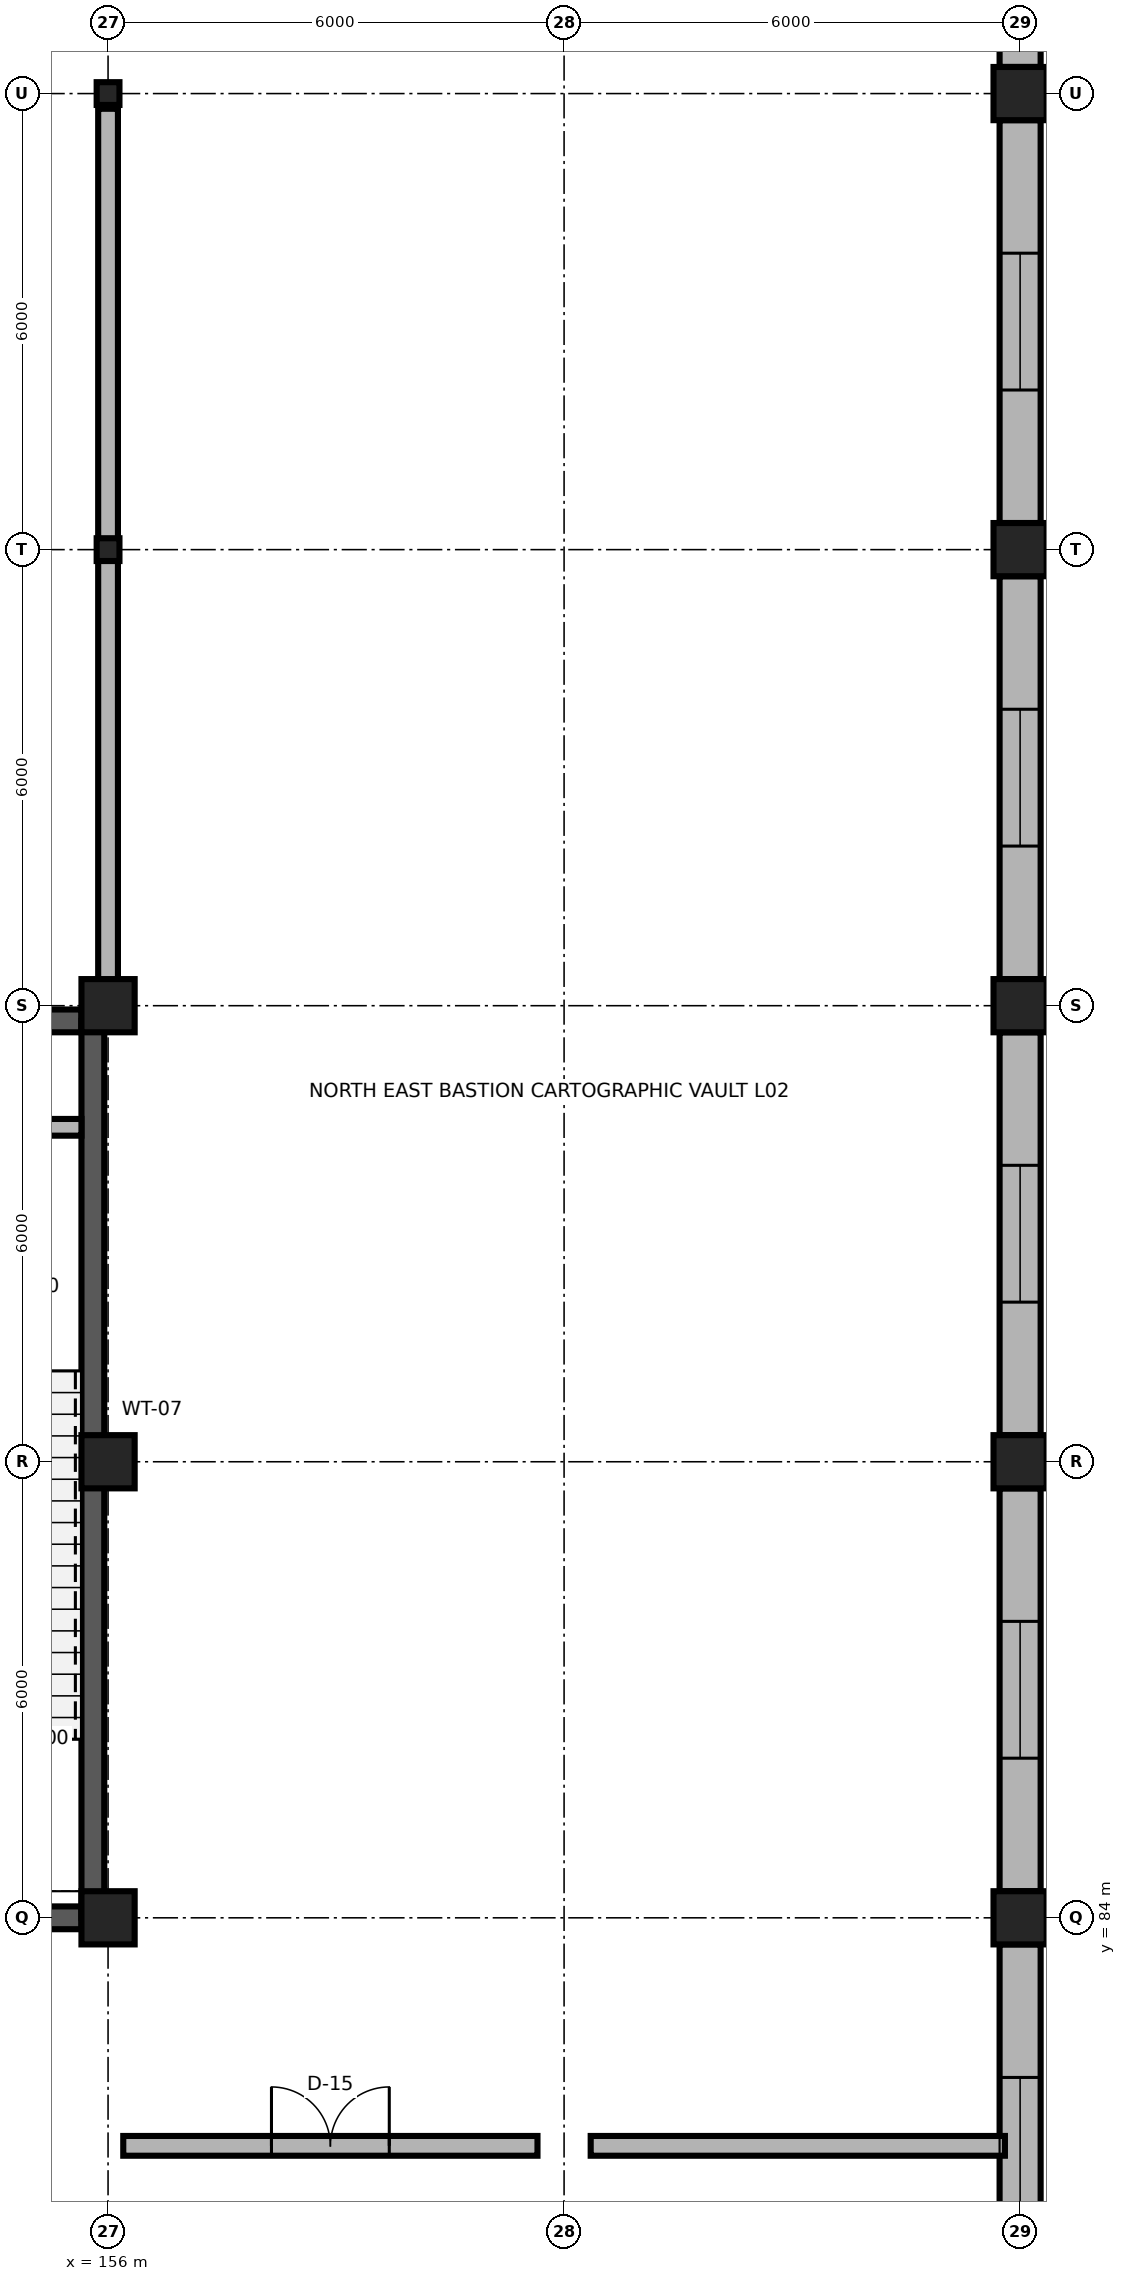
"""IFC4 building model, lengths in metres.
Left out: names, types, materials, properties, quantities, classifications, styles, units other than length and angle.
Written with IfcOpenShell. Run it as: python <this file> out.ifc"""

import sys

from ifc_helpers import new_model, si_unit, direction, frame, frame_2d, origin, origin_2d, place, context, subcontext, project, spatial, rectangle, i_section, extrude, element, fill, save


model = new_model("IFC4")
c1 = context("Model", 3, precision=1e-05, world=origin(), true_north=direction((0.0, 1.0)))
c2 = subcontext(c1, "Body", "Model", "MODEL_VIEW")
j1 = project(units=[si_unit("LENGTHUNIT", "METRE"), si_unit("PLANEANGLEUNIT", "RADIAN")], contexts=[c1])
p1 = place(None, origin())
s1 = spatial("IfcSite", under=j1, at=p1, CompositionType="ELEMENT")
p2 = place(p1, origin())
s2 = spatial("IfcBuilding", under=s1, at=p2, CompositionType="ELEMENT")
p3 = place(p2, frame((0.0, 0.0, 6.0)))
s3 = spatial("IfcBuildingStorey", under=s2, at=p3, CompositionType="ELEMENT", Elevation=6.0)
for number, where, z_axis, x_axis in (
    (1, (156.0, 84.0, 0.0), (0.0, 0.0, 1.0), (1.0, 0.0, 0.0)),
    (2, (168.0, 84.0, 0.0), (0.0, 0.0, 1.0), (1.0, 0.0, 0.0)),
    (3, (156.0, 90.0, 0.0), (0.0, 0.0, 1.0), (1.0, 0.0, 0.0)),
    (4, (168.0, 90.0, 0.0), (0.0, 0.0, 1.0), (1.0, 0.0, 0.0)),
    (5, (156.0, 96.0, 0.0), (0.0, 0.0, 1.0), (1.0, 0.0, 0.0)),
    (6, (168.0, 96.0, 0.0), (0.0, 0.0, 1.0), (1.0, 0.0, 0.0)),
):
    element("IfcColumn", number, at=place(p3, frame(where, z_axis=z_axis, x_axis=x_axis)), inside=s3, PredefinedType="COLUMN", context=c2, shape_type="SweptSolid", body=[
        extrude(rectangle(XDim=0.7, YDim=0.7, at=origin_2d()), origin(), (0.0, 0.0, 1.0), 6.0),
    ])
p4 = place(p3, frame((156.0, 102.0, 0.0), z_axis=(0.0, 0.0, 1.0), x_axis=(1.0, 0.0, 0.0)))
e7 = element("IfcColumn", 7, at=p4, inside=s3, PredefinedType="COLUMN", context=c2, shape_type="SweptSolid", body=[
    extrude(i_section(OverallWidth=0.3, OverallDepth=0.3, WebThickness=0.01, FlangeThickness=0.015, FilletRadius=0.018, at=origin_2d()), origin(), (0.0, 0.0, 1.0), 6.0),
])
p5 = place(p3, frame((168.0, 102.0, 0.0), z_axis=(0.0, 0.0, 1.0), x_axis=(1.0, 0.0, 0.0)))
e8 = element("IfcColumn", 8, at=p5, inside=s3, PredefinedType="COLUMN", context=c2, shape_type="SweptSolid", body=[
    extrude(rectangle(XDim=0.7, YDim=0.7, at=origin_2d()), origin(), (0.0, 0.0, 1.0), 6.0),
])
p6 = place(p3, frame((156.0, 108.0, 0.0), z_axis=(0.0, 0.0, 1.0), x_axis=(1.0, 0.0, 0.0)))
e9 = element("IfcColumn", 9, at=p6, inside=s3, PredefinedType="COLUMN", context=c2, shape_type="SweptSolid", body=[
    extrude(i_section(OverallWidth=0.3, OverallDepth=0.3, WebThickness=0.01, FlangeThickness=0.015, FilletRadius=0.018, at=origin_2d()), origin(), (0.0, 0.0, 1.0), 6.0),
])
p7 = place(p3, frame((168.0, 108.0, 0.0), z_axis=(0.0, 0.0, 1.0), x_axis=(1.0, 0.0, 0.0)))
e10 = element("IfcColumn", 10, at=p7, inside=s3, PredefinedType="COLUMN", context=c2, shape_type="SweptSolid", body=[
    extrude(rectangle(XDim=0.7, YDim=0.7, at=origin_2d()), origin(), (0.0, 0.0, 1.0), 6.0),
])
p8 = place(p3, frame((168.0, 78.35, 0.0), z_axis=(0.0, 0.0, 1.0), x_axis=(0.0, 1.0, 0.0)))
e11 = element("IfcWall", 11, at=p8, inside=s3, PredefinedType="SOLIDWALL", context=c2, shape_type="SweptSolid", body=[
    extrude(rectangle(XDim=5.3, YDim=0.54, at=frame_2d((2.65, 0.0))), origin(), (0.0, 0.0, 1.0), 5.31),
])
p9 = place(p8, frame((1.75, 0.0, 0.85)))
e12 = element("IfcOpeningElement", 12, at=p9, cuts=e11, PredefinedType="OPENING", context=c2, shape_type="SweptSolid", body=[
    extrude(rectangle(XDim=1.8, YDim=3.3, at=frame_2d((0.9, 1.65))), frame((0.0, 0.285, 0.0), z_axis=(0.0, -1.0, 0.0), x_axis=(1.0, 0.0, 0.0)), (0.0, 0.0, 1.0), 0.57),
])
p10 = place(p3, frame((168.0, 84.35, 0.0), z_axis=(0.0, 0.0, 1.0), x_axis=(0.0, 1.0, 0.0)))
e13 = element("IfcWall", 13, at=p10, inside=s3, PredefinedType="SOLIDWALL", context=c2, shape_type="SweptSolid", body=[
    extrude(rectangle(XDim=5.3, YDim=0.54, at=frame_2d((2.65, 0.0))), origin(), (0.0, 0.0, 1.0), 5.31),
])
p11 = place(p10, frame((1.75, 0.0, 0.85)))
e14 = element("IfcOpeningElement", 14, at=p11, cuts=e13, PredefinedType="OPENING", context=c2, shape_type="SweptSolid", body=[
    extrude(rectangle(XDim=1.8, YDim=3.3, at=frame_2d((0.9, 1.65))), frame((0.0, 0.285, 0.0), z_axis=(0.0, -1.0, 0.0), x_axis=(1.0, 0.0, 0.0)), (0.0, 0.0, 1.0), 0.57),
])
p12 = place(p3, frame((168.0, 90.35, 0.0), z_axis=(0.0, 0.0, 1.0), x_axis=(0.0, 1.0, 0.0)))
e15 = element("IfcWall", 15, at=p12, inside=s3, PredefinedType="SOLIDWALL", context=c2, shape_type="SweptSolid", body=[
    extrude(rectangle(XDim=5.3, YDim=0.54, at=frame_2d((2.65, 0.0))), origin(), (0.0, 0.0, 1.0), 5.31),
])
p13 = place(p12, frame((1.75, 0.0, 0.85)))
e16 = element("IfcOpeningElement", 16, at=p13, cuts=e15, PredefinedType="OPENING", context=c2, shape_type="SweptSolid", body=[
    extrude(rectangle(XDim=1.8, YDim=3.3, at=frame_2d((0.9, 1.65))), frame((0.0, 0.285, 0.0), z_axis=(0.0, -1.0, 0.0), x_axis=(1.0, 0.0, 0.0)), (0.0, 0.0, 1.0), 0.57),
])
p14 = place(p3, frame((168.0, 96.35, 0.0), z_axis=(0.0, 0.0, 1.0), x_axis=(0.0, 1.0, 0.0)))
e17 = element("IfcWall", 17, at=p14, inside=s3, PredefinedType="SOLIDWALL", context=c2, shape_type="SweptSolid", body=[
    extrude(rectangle(XDim=5.3, YDim=0.54, at=frame_2d((2.65, 0.0))), origin(), (0.0, 0.0, 1.0), 5.31),
])
p15 = place(p14, frame((1.75, 0.0, 0.85)))
e18 = element("IfcOpeningElement", 18, at=p15, cuts=e17, PredefinedType="OPENING", context=c2, shape_type="SweptSolid", body=[
    extrude(rectangle(XDim=1.8, YDim=3.3, at=frame_2d((0.9, 1.65))), frame((0.0, 0.285, 0.0), z_axis=(0.0, -1.0, 0.0), x_axis=(1.0, 0.0, 0.0)), (0.0, 0.0, 1.0), 0.57),
])
p16 = place(p3, frame((168.0, 102.35, 0.0), z_axis=(0.0, 0.0, 1.0), x_axis=(0.0, 1.0, 0.0)))
e19 = element("IfcWall", 19, at=p16, inside=s3, PredefinedType="SOLIDWALL", context=c2, shape_type="SweptSolid", body=[
    extrude(rectangle(XDim=5.3, YDim=0.54, at=frame_2d((2.65, 0.0))), origin(), (0.0, 0.0, 1.0), 5.31),
])
p17 = place(p16, frame((1.75, 0.0, 0.85)))
e20 = element("IfcOpeningElement", 20, at=p17, cuts=e19, PredefinedType="OPENING", context=c2, shape_type="SweptSolid", body=[
    extrude(rectangle(XDim=1.8, YDim=3.3, at=frame_2d((0.9, 1.65))), frame((0.0, 0.285, 0.0), z_axis=(0.0, -1.0, 0.0), x_axis=(1.0, 0.0, 0.0)), (0.0, 0.0, 1.0), 0.57),
])
p18 = place(p3, frame((168.0, 108.35, 0.0), z_axis=(0.0, 0.0, 1.0), x_axis=(0.0, 1.0, 0.0)))
e21 = element("IfcWall", 21, at=p18, inside=s3, PredefinedType="SOLIDWALL", context=c2, shape_type="SweptSolid", body=[
    extrude(rectangle(XDim=5.3, YDim=0.54, at=frame_2d((2.65, 0.0))), origin(), (0.0, 0.0, 1.0), 5.31),
])
p19 = place(p18, frame((1.9, 0.0, 0.85)))
e22 = element("IfcOpeningElement", 22, at=p19, cuts=e21, PredefinedType="OPENING", context=c2, shape_type="SweptSolid", body=[
    extrude(rectangle(XDim=1.5, YDim=2.8, at=frame_2d((0.75, 1.4))), frame((0.0, 0.285, 0.0), z_axis=(0.0, -1.0, 0.0), x_axis=(1.0, 0.0, 0.0)), (0.0, 0.0, 1.0), 0.57),
])
p20 = place(p3, frame((150.35, 84.0, 0.0), z_axis=(0.0, 0.0, 1.0), x_axis=(1.0, 0.0, 0.0)))
e23 = element("IfcWall", 23, at=p20, inside=s3, PredefinedType="SHEAR", context=c2, shape_type="SweptSolid", body=[
    extrude(rectangle(XDim=5.3, YDim=0.3, at=frame_2d((2.65, 0.0))), origin(), (0.0, 0.0, 1.0), 5.76),
])
p21 = place(p20, frame((1.925, 0.0, 0.0)))
e24 = element("IfcOpeningElement", 24, at=p21, cuts=e23, PredefinedType="OPENING", context=c2, shape_type="SweptSolid", body=[
    extrude(rectangle(XDim=1.45, YDim=2.25, at=frame_2d((0.725, 1.125))), frame((0.0, 0.165, 0.0), z_axis=(0.0, -1.0, 0.0), x_axis=(1.0, 0.0, 0.0)), (0.0, 0.0, 1.0), 0.33),
])
p22 = place(p3, frame((150.35, 95.8, 0.0), z_axis=(0.0, 0.0, 1.0), x_axis=(1.0, 0.0, 0.0)))
e25 = element("IfcWall", 25, at=p22, inside=s3, PredefinedType="SHEAR", context=c2, shape_type="SweptSolid", body=[
    extrude(rectangle(XDim=5.3, YDim=0.3, at=frame_2d((2.65, 0.0))), origin(), (0.0, 0.0, 1.0), 5.76),
])
p23 = place(p3, frame((155.8, 84.0, 0.0), z_axis=(0.0, 0.0, 1.0), x_axis=(0.0, 1.0, 0.0)))
e26 = element("IfcWall", 26, at=p23, inside=s3, PredefinedType="SHEAR", context=c2, shape_type="SweptSolid", body=[
    extrude(rectangle(XDim=11.8, YDim=0.3, at=frame_2d((5.9, 0.0))), origin(), (0.0, 0.0, 1.0), 5.76),
])
p24 = place(p3, frame((154.55, 94.4, 0.0), z_axis=(0.0, 0.0, 1.0), x_axis=(1.0, 0.0, 0.0)))
e27 = element("IfcWall", 27, at=p24, inside=s3, PredefinedType="PARTITIONING", context=c2, shape_type="SweptSolid", body=[
    extrude(rectangle(XDim=1.1, YDim=0.22, at=frame_2d((0.55, 0.0))), origin(), (0.0, 0.0, 1.0), 5.76),
])
p25 = place(p3, frame((156.2, 81.0, 0.0), z_axis=(0.0, 0.0, 1.0), x_axis=(1.0, 0.0, 0.0)))
e28 = element("IfcWall", 28, at=p25, inside=s3, PredefinedType="PARTITIONING", context=c2, shape_type="SweptSolid", body=[
    extrude(rectangle(XDim=5.45, YDim=0.26, at=frame_2d((2.725, 0.0))), origin(), (0.0, 0.0, 1.0), 5.76),
])
p26 = place(p25, frame((1.95, 0.0, 0.0)))
e29 = element("IfcOpeningElement", 29, at=p26, cuts=e28, PredefinedType="OPENING", context=c2, shape_type="SweptSolid", body=[
    extrude(rectangle(XDim=1.55, YDim=2.3, at=frame_2d((0.775, 1.15))), frame((0.0, 0.145, 0.0), z_axis=(0.0, -1.0, 0.0), x_axis=(1.0, 0.0, 0.0)), (0.0, 0.0, 1.0), 0.29),
])
p27 = place(p3, frame((162.35, 81.0, 0.0), z_axis=(0.0, 0.0, 1.0), x_axis=(1.0, 0.0, 0.0)))
e30 = element("IfcWall", 30, at=p27, inside=s3, PredefinedType="PARTITIONING", context=c2, shape_type="SweptSolid", body=[
    extrude(rectangle(XDim=5.45, YDim=0.26, at=frame_2d((2.725, 0.0))), origin(), (0.0, 0.0, 1.0), 5.76),
])
p28 = place(p3, frame((156.0, 96.2, 0.0), z_axis=(0.0, 0.0, 1.0), x_axis=(0.0, 1.0, 0.0)))
e31 = element("IfcWall", 31, at=p28, inside=s3, PredefinedType="PARTITIONING", context=c2, shape_type="SweptSolid", body=[
    extrude(rectangle(XDim=11.6, YDim=0.26, at=frame_2d((5.8, 0.0))), origin(), (0.0, 0.0, 1.0), 5.32),
])
p29 = place(p9, origin())
e32 = element("IfcWindow", 32, at=p29, inside=s3, PartitioningType="SINGLE_PANEL", PredefinedType="WINDOW", context=c2, shape_type="SweptSolid", body=[
    extrude(rectangle(XDim=1.8, YDim=3.3, at=frame_2d((0.9, 1.65))), frame((0.0, 0.03, 0.0), z_axis=(0.0, -1.0, 0.0), x_axis=(1.0, 0.0, 0.0)), (0.0, 0.0, 1.0), 0.06),
])
fill(e12, e32)
p30 = place(p11, origin())
e33 = element("IfcWindow", 33, at=p30, inside=s3, PartitioningType="SINGLE_PANEL", PredefinedType="WINDOW", context=c2, shape_type="SweptSolid", body=[
    extrude(rectangle(XDim=1.8, YDim=3.3, at=frame_2d((0.9, 1.65))), frame((0.0, 0.03, 0.0), z_axis=(0.0, -1.0, 0.0), x_axis=(1.0, 0.0, 0.0)), (0.0, 0.0, 1.0), 0.06),
])
fill(e14, e33)
p31 = place(p13, origin())
e34 = element("IfcWindow", 34, at=p31, inside=s3, PartitioningType="SINGLE_PANEL", PredefinedType="WINDOW", context=c2, shape_type="SweptSolid", body=[
    extrude(rectangle(XDim=1.8, YDim=3.3, at=frame_2d((0.9, 1.65))), frame((0.0, 0.03, 0.0), z_axis=(0.0, -1.0, 0.0), x_axis=(1.0, 0.0, 0.0)), (0.0, 0.0, 1.0), 0.06),
])
fill(e16, e34)
p32 = place(p15, origin())
e35 = element("IfcWindow", 35, at=p32, inside=s3, PartitioningType="SINGLE_PANEL", PredefinedType="WINDOW", context=c2, shape_type="SweptSolid", body=[
    extrude(rectangle(XDim=1.8, YDim=3.3, at=frame_2d((0.9, 1.65))), frame((0.0, 0.03, 0.0), z_axis=(0.0, -1.0, 0.0), x_axis=(1.0, 0.0, 0.0)), (0.0, 0.0, 1.0), 0.06),
])
fill(e18, e35)
p33 = place(p17, origin())
e36 = element("IfcWindow", 36, at=p33, inside=s3, PartitioningType="SINGLE_PANEL", PredefinedType="WINDOW", context=c2, shape_type="SweptSolid", body=[
    extrude(rectangle(XDim=1.8, YDim=3.3, at=frame_2d((0.9, 1.65))), frame((0.0, 0.03, 0.0), z_axis=(0.0, -1.0, 0.0), x_axis=(1.0, 0.0, 0.0)), (0.0, 0.0, 1.0), 0.06),
])
fill(e20, e36)
p34 = place(p26, origin())
e37 = element("IfcDoor", 37, at=p34, inside=s3, OperationType="DOUBLE_DOOR_SINGLE_SWING", PredefinedType="DOOR", context=c2, shape_type="SweptSolid", body=[
    extrude(rectangle(XDim=1.55, YDim=2.3, at=frame_2d((0.775, 1.15))), frame((0.0, 0.025, 0.0), z_axis=(0.0, -1.0, 0.0), x_axis=(1.0, 0.0, 0.0)), (0.0, 0.0, 1.0), 0.05),
])
fill(e29, e37)
save(model, sys.argv[1])
